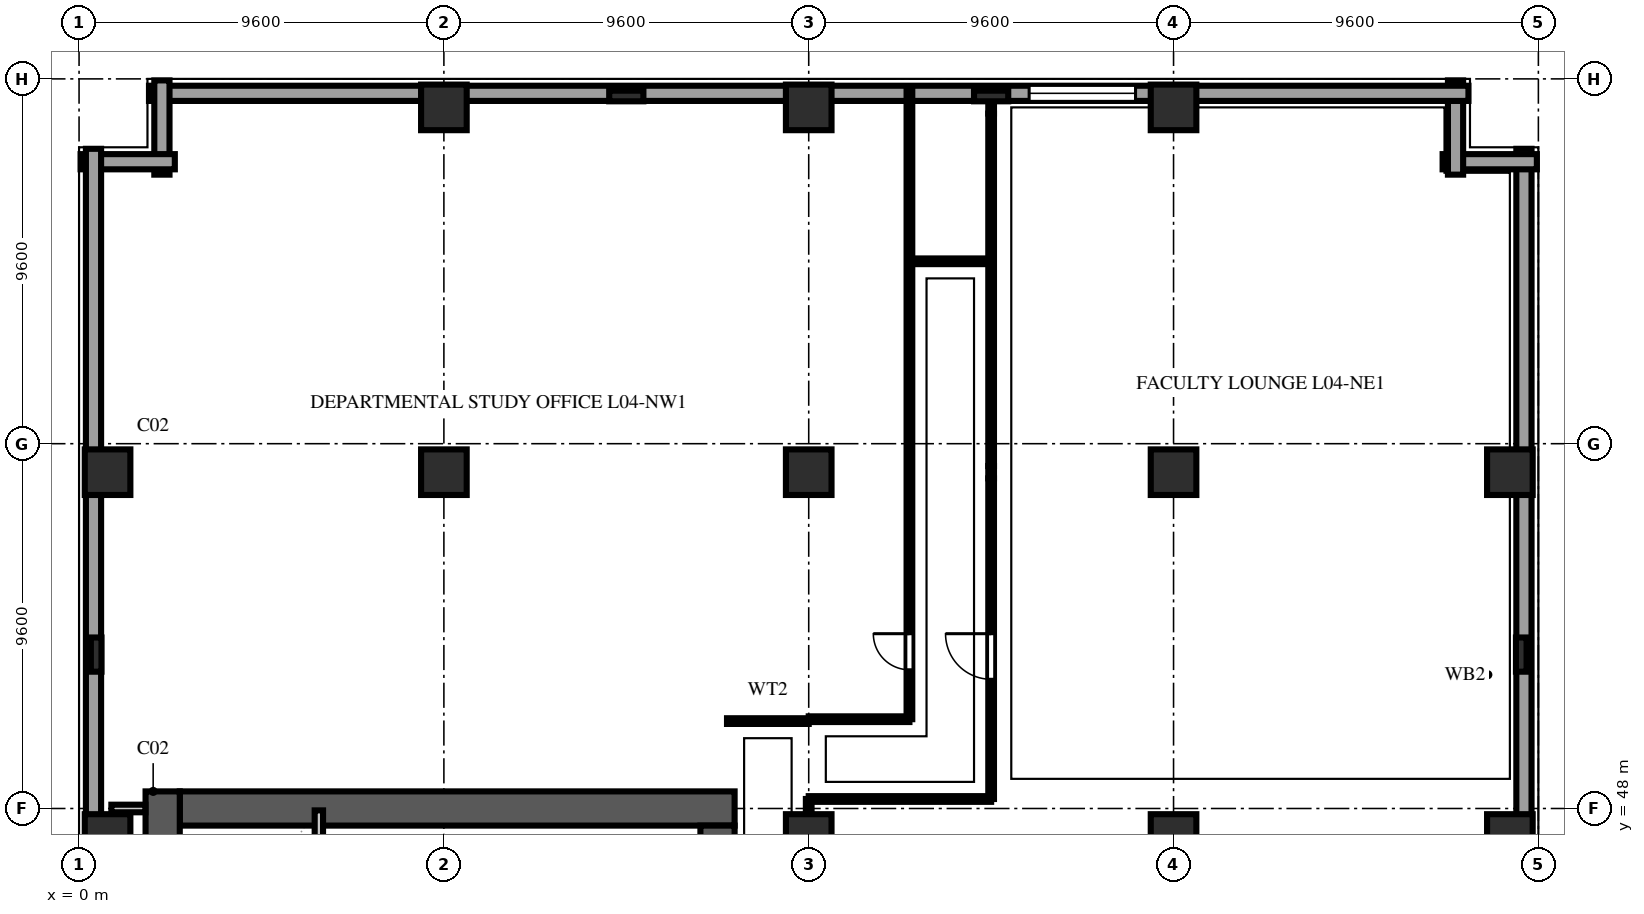
"""IFC4 building model, lengths in metres.
Left out: names, types, materials, properties, quantities, classifications, styles, units other than length and angle.
Written with IfcOpenShell. Run it as: python <this file> out.ifc"""

import sys

from ifc_helpers import new_model, si_unit, direction, frame, frame_2d, origin, origin_2d, place, context, subcontext, project, spatial, rectangle, extrude, element, fill, save


model = new_model("IFC4")
c1 = context("Model", 3, precision=1e-05, world=origin(), true_north=direction((0.0, 1.0)))
c2 = subcontext(c1, "Body", "Model", "MODEL_VIEW")
j1 = project(units=[si_unit("LENGTHUNIT", "METRE"), si_unit("PLANEANGLEUNIT", "RADIAN")], contexts=[c1])
p1 = place(None, origin())
s1 = spatial("IfcSite", under=j1, at=p1, CompositionType="ELEMENT")
p2 = place(p1, origin())
s2 = spatial("IfcBuilding", under=s1, at=p2, CompositionType="ELEMENT")
p3 = place(p2, frame((0.0, 0.0, 19.6)))
s3 = spatial("IfcBuildingStorey", under=s2, at=p3, CompositionType="ELEMENT", Elevation=19.6)
p4 = place(p3, frame((2.65, 48.0, 0.0), z_axis=(0.0, 0.0, 1.0), x_axis=(1.0, 0.0, 0.0)))
e1 = element("IfcWall", 1, at=p4, inside=s3, PredefinedType="SHEAR", context=c2, shape_type="SweptSolid", body=[
    extrude(rectangle(XDim=14.6, YDim=0.9, at=frame_2d((7.3, 0.0))), origin(), (0.0, 0.0, 1.0), 4.34),
])
p5 = place(p3, frame((2.2, 9.15, 0.0), z_axis=(0.0, 0.0, 1.0), x_axis=(0.0, 1.0, 0.0)))
e2 = element("IfcWall", 2, at=p5, inside=s3, PredefinedType="SHEAR", context=c2, shape_type="SweptSolid", body=[
    extrude(rectangle(XDim=39.3, YDim=0.9, at=frame_2d((19.65, 0.0))), origin(), (0.0, 0.0, 1.0), 4.34),
])
p6 = place(p3, frame((16.8, 36.4, 0.0), z_axis=(0.0, 0.0, 1.0), x_axis=(0.0, 1.0, 0.0)))
e3 = element("IfcWall", 3, at=p6, inside=s3, PredefinedType="SHEAR", context=c2, shape_type="SweptSolid", body=[
    extrude(rectangle(XDim=11.15, YDim=0.9, at=frame_2d((5.575, 0.0))), origin(), (0.0, 0.0, 1.0), 4.34),
])
p7 = place(p6, frame((9.2, 0.0, 0.0)))
e4 = element("IfcOpeningElement", 4, at=p7, cuts=e3, PredefinedType="OPENING", context=c2, shape_type="SweptSolid", body=[
    extrude(rectangle(XDim=0.95, YDim=2.15, at=frame_2d((0.475, 1.075))), frame((0.0, 0.462, 0.0), z_axis=(0.0, -1.0, 0.0), x_axis=(1.0, 0.0, 0.0)), (0.0, 0.0, 1.0), 0.924),
])
for number, where, z_axis, x_axis in (
    (5, (0.75, 47.25, 0.0), (0.0, 0.0, 1.0), (1.0, 0.0, 0.0)),
    (6, (0.75, 56.85, 0.0), (0.0, 0.0, 1.0), (1.0, 0.0, 0.0)),
    (7, (9.6, 56.85, 0.0), (0.0, 0.0, 1.0), (1.0, 0.0, 0.0)),
    (8, (9.6, 66.45, 0.0), (0.0, 0.0, 1.0), (1.0, 0.0, 0.0)),
    (9, (19.2, 47.25, 0.0), (0.0, 0.0, 1.0), (1.0, 0.0, 0.0)),
    (10, (19.2, 56.85, 0.0), (0.0, 0.0, 1.0), (1.0, 0.0, 0.0)),
    (11, (19.2, 66.45, 0.0), (0.0, 0.0, 1.0), (1.0, 0.0, 0.0)),
    (12, (28.8, 47.25, 0.0), (0.0, 0.0, 1.0), (1.0, 0.0, 0.0)),
    (13, (28.8, 56.85, 0.0), (0.0, 0.0, 1.0), (1.0, 0.0, 0.0)),
    (14, (28.8, 66.45, 0.0), (0.0, 0.0, 1.0), (1.0, 0.0, 0.0)),
    (15, (37.65, 47.25, 0.0), (0.0, 0.0, 1.0), (1.0, 0.0, 0.0)),
    (16, (37.65, 56.85, 0.0), (0.0, 0.0, 1.0), (1.0, 0.0, 0.0)),
):
    element("IfcColumn", number, at=place(p3, frame(where, z_axis=z_axis, x_axis=x_axis)), inside=s3, PredefinedType="COLUMN", context=c2, shape_type="SweptSolid", body=[
        extrude(rectangle(XDim=1.2, YDim=1.2, at=origin_2d()), origin(), (0.0, 0.0, 1.0), 4.6),
    ])
for number, where, z_axis, x_axis in (
    (17, (0.45, 52.05, 0.0), (0.0, 0.0, 1.0), (0.0, 1.0, 0.0)),
    (18, (14.4, 66.75, 0.0), (0.0, 0.0, 1.0), (1.0, 0.0, 0.0)),
    (19, (24.0, 66.75, 0.0), (0.0, 0.0, 1.0), (1.0, 0.0, 0.0)),
    (20, (37.95, 52.05, 0.0), (0.0, 0.0, 1.0), (0.0, 1.0, 0.0)),
):
    element("IfcColumn", number, at=place(p3, frame(where, z_axis=z_axis, x_axis=x_axis)), inside=s3, PredefinedType="PILASTER", context=c2, shape_type="SweptSolid", body=[
        extrude(rectangle(XDim=0.9, YDim=0.28, at=origin_2d()), origin(), (0.0, 0.0, 1.0), 4.6),
    ])
p8 = place(p3, frame((38.02, 37.68, 0.0), z_axis=(0.0, 0.0, 1.0), x_axis=(0.0, 1.0, 0.0)))
e21 = element("IfcWall", 21, at=p8, inside=s3, PredefinedType="SOLIDWALL", context=c2, shape_type="SweptSolid", body=[
    extrude(rectangle(XDim=27.68, YDim=0.4, at=frame_2d((13.84, 0.0))), origin(), (0.0, 0.0, 1.0), 4.34),
])
p9 = place(p3, frame((38.36, 65.02, 0.0), z_axis=(0.0, 0.0, 1.0), x_axis=(-1.0, 0.0, 0.0)))
e22 = element("IfcWall", 22, at=p9, inside=s3, PredefinedType="SOLIDWALL", context=c2, shape_type="SweptSolid", body=[
    extrude(rectangle(XDim=2.48, YDim=0.4, at=frame_2d((1.24, 0.0))), origin(), (0.0, 0.0, 1.0), 4.34),
])
p10 = place(p3, frame((36.22, 64.68, 0.0), z_axis=(0.0, 0.0, 1.0), x_axis=(0.0, 1.0, 0.0)))
e23 = element("IfcWall", 23, at=p10, inside=s3, PredefinedType="SOLIDWALL", context=c2, shape_type="SweptSolid", body=[
    extrude(rectangle(XDim=2.48, YDim=0.4, at=frame_2d((1.24, 0.0))), origin(), (0.0, 0.0, 1.0), 4.34),
])
p11 = place(p3, frame((36.56, 66.82, 0.0), z_axis=(0.0, 0.0, 1.0), x_axis=(-1.0, 0.0, 0.0)))
e24 = element("IfcWall", 24, at=p11, inside=s3, PredefinedType="SOLIDWALL", context=c2, shape_type="SweptSolid", body=[
    extrude(rectangle(XDim=34.72, YDim=0.4, at=frame_2d((17.36, 0.0))), origin(), (0.0, 0.0, 1.0), 4.34),
])
p12 = place(p11, frame((8.76, 0.0, 0.75)))
e25 = element("IfcOpeningElement", 25, at=p12, cuts=e24, PredefinedType="OPENING", context=c2, shape_type="SweptSolid", body=[
    extrude(rectangle(XDim=2.8, YDim=2.3, at=frame_2d((1.4, 1.15))), frame((0.0, 0.212, 0.0), z_axis=(0.0, -1.0, 0.0), x_axis=(1.0, 0.0, 0.0)), (0.0, 0.0, 1.0), 0.424),
])
for number, where, z_axis, x_axis in (
    (26, (2.18, 67.16, 0.0), (0.0, 0.0, 1.0), (0.0, -1.0, 0.0)),
    (27, (2.52, 65.02, 0.0), (0.0, 0.0, 1.0), (-1.0, 0.0, 0.0)),
):
    element("IfcWall", number, at=place(p3, frame(where, z_axis=z_axis, x_axis=x_axis)), inside=s3, PredefinedType="SOLIDWALL", context=c2, shape_type="SweptSolid", body=[
        extrude(rectangle(XDim=2.48, YDim=0.4, at=frame_2d((1.24, 0.0))), origin(), (0.0, 0.0, 1.0), 4.34),
    ])
p13 = place(p3, frame((0.38, 65.36, 0.0), z_axis=(0.0, 0.0, 1.0), x_axis=(0.0, -1.0, 0.0)))
e28 = element("IfcWall", 28, at=p13, inside=s3, PredefinedType="SOLIDWALL", context=c2, shape_type="SweptSolid", body=[
    extrude(rectangle(XDim=63.52, YDim=0.4, at=frame_2d((31.76, 0.0))), origin(), (0.0, 0.0, 1.0), 4.34),
])
p14 = place(p13, frame((32.76, 0.0, 0.75)))
e29 = element("IfcOpeningElement", 29, at=p14, cuts=e28, PredefinedType="OPENING", context=c2, shape_type="SweptSolid", body=[
    extrude(rectangle(XDim=2.8, YDim=2.3, at=frame_2d((1.4, 1.15))), frame((0.0, 0.212, 0.0), z_axis=(0.0, -1.0, 0.0), x_axis=(1.0, 0.0, 0.0)), (0.0, 0.0, 1.0), 0.424),
])
p15 = place(p13, frame((37.56, 0.0, 0.75)))
e30 = element("IfcOpeningElement", 30, at=p15, cuts=e28, PredefinedType="OPENING", context=c2, shape_type="SweptSolid", body=[
    extrude(rectangle(XDim=2.8, YDim=2.3, at=frame_2d((1.4, 1.15))), frame((0.0, 0.212, 0.0), z_axis=(0.0, -1.0, 0.0), x_axis=(1.0, 0.0, 0.0)), (0.0, 0.0, 1.0), 0.424),
])
p16 = place(p13, frame((42.36, 0.0, 0.75)))
e31 = element("IfcOpeningElement", 31, at=p16, cuts=e28, PredefinedType="OPENING", context=c2, shape_type="SweptSolid", body=[
    extrude(rectangle(XDim=2.8, YDim=2.3, at=frame_2d((1.4, 1.15))), frame((0.0, 0.212, 0.0), z_axis=(0.0, -1.0, 0.0), x_axis=(1.0, 0.0, 0.0)), (0.0, 0.0, 1.0), 0.424),
])
p17 = place(p13, frame((47.16, 0.0, 0.75)))
e32 = element("IfcOpeningElement", 32, at=p17, cuts=e28, PredefinedType="OPENING", context=c2, shape_type="SweptSolid", body=[
    extrude(rectangle(XDim=2.8, YDim=2.3, at=frame_2d((1.4, 1.15))), frame((0.0, 0.212, 0.0), z_axis=(0.0, -1.0, 0.0), x_axis=(1.0, 0.0, 0.0)), (0.0, 0.0, 1.0), 0.424),
])
p18 = place(p13, frame((51.96, 0.0, 0.75)))
e33 = element("IfcOpeningElement", 33, at=p18, cuts=e28, PredefinedType="OPENING", context=c2, shape_type="SweptSolid", body=[
    extrude(rectangle(XDim=2.8, YDim=2.3, at=frame_2d((1.4, 1.15))), frame((0.0, 0.212, 0.0), z_axis=(0.0, -1.0, 0.0), x_axis=(1.0, 0.0, 0.0)), (0.0, 0.0, 1.0), 0.424),
])
p19 = place(p3, frame((6.31, 40.14, 0.0), z_axis=(0.0, 0.0, 1.0), x_axis=(0.0, 1.0, 0.0)))
e34 = element("IfcWall", 34, at=p19, inside=s3, PredefinedType="SOLIDWALL", context=c2, shape_type="SweptSolid", body=[
    extrude(rectangle(XDim=7.81, YDim=0.22, at=frame_2d((3.905, 0.0))), origin(), (0.0, 0.0, 1.0), 4.34),
])
p20 = place(p3, frame((0.85, 48.0, 0.0), z_axis=(0.0, 0.0, 1.0), x_axis=(1.0, 0.0, 0.0)))
e35 = element("IfcWall", 35, at=p20, inside=s3, PredefinedType="SOLIDWALL", context=c2, shape_type="SweptSolid", body=[
    extrude(rectangle(XDim=0.895, YDim=0.2, at=frame_2d((0.448, 0.0))), origin(), (0.0, 0.0, 1.0), 4.34),
])
p21 = place(p3, frame((17.05, 50.3, 0.0), z_axis=(0.0, 0.0, 1.0), x_axis=(1.0, 0.0, 0.0)))
e36 = element("IfcWall", 36, at=p21, inside=s3, PredefinedType="PARTITIONING", context=c2, shape_type="SweptSolid", body=[
    extrude(rectangle(XDim=2.15, YDim=0.15, at=frame_2d((1.075, 0.0))), origin(), (0.0, 0.0, 1.0), 4.34),
])
p22 = place(p3, frame((19.2, 26.25, 0.0), z_axis=(0.0, 0.0, 1.0), x_axis=(0.0, 1.0, 0.0)))
e37 = element("IfcWall", 37, at=p22, inside=s3, PredefinedType="PARTITIONING", context=c2, shape_type="SweptSolid", body=[
    extrude(rectangle(XDim=22.0, YDim=0.15, at=frame_2d((11.0, 0.0))), origin(), (0.0, 0.0, 1.0), 3.724),
])
p23 = place(p22, frame((15.6, 0.0, 0.0)))
e38 = element("IfcOpeningElement", 38, at=p23, cuts=e37, PredefinedType="OPENING", context=c2, shape_type="SweptSolid", body=[
    extrude(rectangle(XDim=1.0, YDim=2.2, at=frame_2d((0.5, 1.1))), frame((0.0, 0.087, 0.0), z_axis=(0.0, -1.0, 0.0), x_axis=(1.0, 0.0, 0.0)), (0.0, 0.0, 1.0), 0.174),
])
p24 = place(p3, frame((19.2, 48.25, 0.0), z_axis=(0.0, 0.0, 1.0), x_axis=(1.0, 0.0, 0.0)))
e39 = element("IfcWall", 39, at=p24, inside=s3, PredefinedType="PARTITIONING", context=c2, shape_type="SweptSolid", body=[
    extrude(rectangle(XDim=4.8, YDim=0.15, at=frame_2d((2.4, 0.0))), origin(), (0.0, 0.0, 1.0), 4.34),
])
p25 = place(p3, frame((19.2, 50.35, 0.0), z_axis=(0.0, 0.0, 1.0), x_axis=(1.0, 0.0, 0.0)))
e40 = element("IfcWall", 40, at=p25, inside=s3, PredefinedType="PARTITIONING", context=c2, shape_type="SweptSolid", body=[
    extrude(rectangle(XDim=2.65, YDim=0.15, at=frame_2d((1.325, 0.0))), origin(), (0.0, 0.0, 1.0), 4.34),
])
p26 = place(p3, frame((21.85, 62.4, 0.0), z_axis=(0.0, 0.0, 1.0), x_axis=(1.0, 0.0, 0.0)))
e41 = element("IfcWall", 41, at=p26, inside=s3, PredefinedType="PARTITIONING", context=c2, shape_type="SweptSolid", body=[
    extrude(rectangle(XDim=2.15, YDim=0.15, at=frame_2d((1.075, 0.0))), origin(), (0.0, 0.0, 1.0), 4.34),
])
p27 = place(p3, frame((24.0, 48.25, 0.0), z_axis=(0.0, 0.0, 1.0), x_axis=(0.0, 1.0, 0.0)))
e42 = element("IfcWall", 42, at=p27, inside=s3, PredefinedType="PARTITIONING", context=c2, shape_type="SweptSolid", body=[
    extrude(rectangle(XDim=8.438, YDim=0.15, at=frame_2d((4.219, 0.0))), origin(), (0.0, 0.0, 1.0), 3.796),
])
p28 = place(p27, frame((3.15, 0.0, 0.0)))
e43 = element("IfcOpeningElement", 43, at=p28, cuts=e42, PredefinedType="OPENING", context=c2, shape_type="SweptSolid", body=[
    extrude(rectangle(XDim=1.2, YDim=2.2, at=frame_2d((0.6, 1.1))), frame((0.0, 0.087, 0.0), z_axis=(0.0, -1.0, 0.0), x_axis=(1.0, 0.0, 0.0)), (0.0, 0.0, 1.0), 0.174),
])
p29 = place(p3, frame((24.0, 56.688, 0.0), z_axis=(0.0, 0.0, 1.0), x_axis=(0.0, 1.0, 0.0)))
e44 = element("IfcWall", 44, at=p29, inside=s3, PredefinedType="PARTITIONING", context=c2, shape_type="SweptSolid", body=[
    extrude(rectangle(XDim=0.325, YDim=0.15, at=frame_2d((0.163, 0.0))), origin(), (0.0, 0.0, 1.0), 4.34),
])
p30 = place(p3, frame((24.0, 57.012, 0.0), z_axis=(0.0, 0.0, 1.0), x_axis=(0.0, 1.0, 0.0)))
e45 = element("IfcWall", 45, at=p30, inside=s3, PredefinedType="PARTITIONING", context=c2, shape_type="SweptSolid", body=[
    extrude(rectangle(XDim=9.275, YDim=0.15, at=frame_2d((4.638, 0.0))), origin(), (0.0, 0.0, 1.0), 3.796),
])
p31 = place(p3, frame((24.0, 66.288, 0.0), z_axis=(0.0, 0.0, 1.0), x_axis=(0.0, 1.0, 0.0)))
e46 = element("IfcWall", 46, at=p31, inside=s3, PredefinedType="PARTITIONING", context=c2, shape_type="SweptSolid", body=[
    extrude(rectangle(XDim=0.692, YDim=0.15, at=frame_2d((0.346, 0.0))), origin(), (0.0, 0.0, 1.0), 4.34),
])
p32 = place(p3, frame((21.85, 50.35, 0.0), z_axis=(0.0, 0.0, 1.0), x_axis=(0.0, 1.0, 0.0)))
e47 = element("IfcWall", 47, at=p32, inside=s3, PredefinedType="PARTITIONING", context=c2, shape_type="SweptSolid", body=[
    extrude(rectangle(XDim=16.63, YDim=0.15, at=frame_2d((8.315, 0.0))), origin(), (0.0, 0.0, 1.0), 4.34),
])
p33 = place(p32, frame((1.3, 0.0, 0.0)))
e48 = element("IfcOpeningElement", 48, at=p33, cuts=e47, PredefinedType="OPENING", context=c2, shape_type="SweptSolid", body=[
    extrude(rectangle(XDim=0.95, YDim=2.15, at=frame_2d((0.475, 1.075))), frame((0.0, 0.087, 0.0), z_axis=(0.0, -1.0, 0.0), x_axis=(1.0, 0.0, 0.0)), (0.0, 0.0, 1.0), 0.174),
])
p34 = place(p12, origin())
e49 = element("IfcWindow", 49, at=p34, inside=s3, PartitioningType="TRIPLE_PANEL_VERTICAL", PredefinedType="WINDOW", context=c2, shape_type="SweptSolid", body=[
    extrude(rectangle(XDim=2.8, YDim=2.3, at=frame_2d((1.4, 1.15))), frame((0.0, 0.11, 0.0), z_axis=(0.0, -1.0, 0.0), x_axis=(1.0, 0.0, 0.0)), (0.0, 0.0, 1.0), 0.06),
])
fill(e25, e49)
p35 = place(p28, origin())
e50 = element("IfcDoor", 50, at=p35, inside=s3, OperationType="SINGLE_SWING_RIGHT", PredefinedType="DOOR", context=c2, shape_type="SweptSolid", body=[
    extrude(rectangle(XDim=1.2, YDim=2.2, at=frame_2d((0.6, 1.1))), frame((0.0, 0.025, 0.0), z_axis=(0.0, -1.0, 0.0), x_axis=(1.0, 0.0, 0.0)), (0.0, 0.0, 1.0), 0.05),
])
fill(e43, e50)
p36 = place(p33, origin())
e51 = element("IfcDoor", 51, at=p36, inside=s3, OperationType="SINGLE_SWING_RIGHT", PredefinedType="DOOR", context=c2, shape_type="SweptSolid", body=[
    extrude(rectangle(XDim=0.95, YDim=2.15, at=frame_2d((0.475, 1.075))), frame((0.0, 0.025, 0.0), z_axis=(0.0, -1.0, 0.0), x_axis=(1.0, 0.0, 0.0)), (0.0, 0.0, 1.0), 0.05),
])
fill(e48, e51)
save(model, sys.argv[1])
